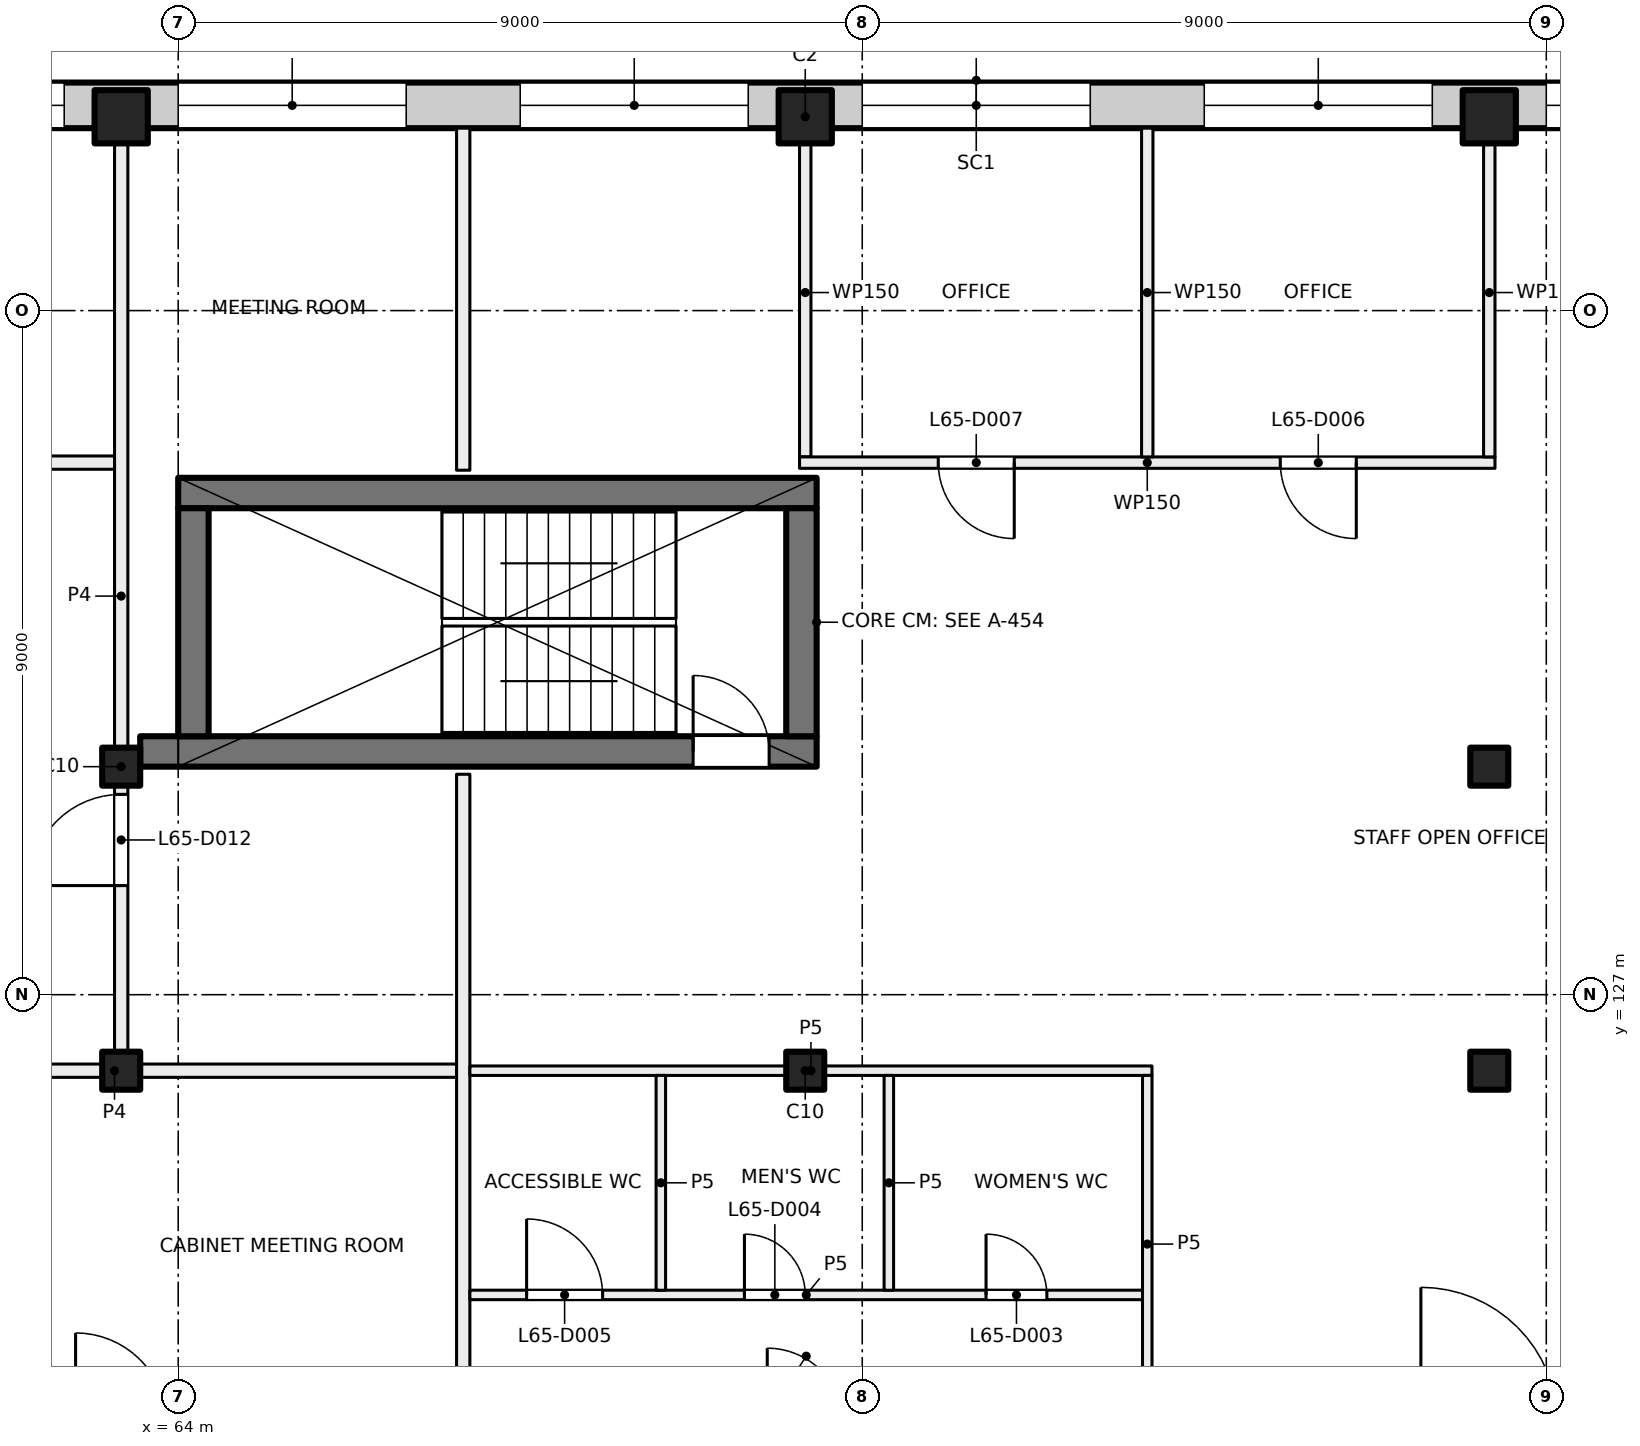
"""IFC4 building model, lengths in metres.
Left out: names, types, materials, properties, quantities, classifications, styles, units other than length and angle.
Written with IfcOpenShell. Run it as: python <this file> out.ifc"""

import sys

from ifc_helpers import new_model, si_unit, direction, frame, frame_2d, origin, origin_2d, place, context, subcontext, project, spatial, rectangle, extrude, element, fill, save


model = new_model("IFC4")
c1 = context("Model", 3, precision=1e-05, world=origin(), true_north=direction((0.0, 1.0)))
c2 = subcontext(c1, "Body", "Model", "MODEL_VIEW")
j1 = project(units=[si_unit("LENGTHUNIT", "METRE"), si_unit("PLANEANGLEUNIT", "RADIAN")], contexts=[c1])
p1 = place(None, origin())
s1 = spatial("IfcSite", under=j1, at=p1, CompositionType="ELEMENT")
p2 = place(p1, origin())
s2 = spatial("IfcBuilding", under=s1, at=p2, CompositionType="ELEMENT")
p3 = place(p2, frame((0.0, 0.0, 273.5)))
s3 = spatial("IfcBuildingStorey", under=s2, at=p3, CompositionType="ELEMENT", Elevation=273.5)
for number, where, z_axis, x_axis in (
    (1, (63.25, 130.0, 0.0), (0.0, 0.0, 1.0), (1.0, 0.0, 0.0)),
    (2, (81.25, 130.0, 0.0), (0.0, 0.0, 1.0), (1.0, 0.0, 0.0)),
    (3, (63.25, 126.0, 0.0), (0.0, 0.0, 1.0), (1.0, 0.0, 0.0)),
    (4, (72.25, 126.0, 0.0), (0.0, 0.0, 1.0), (1.0, 0.0, 0.0)),
    (5, (81.25, 126.0, 0.0), (0.0, 0.0, 1.0), (1.0, 0.0, 0.0)),
):
    element("IfcColumn", number, at=place(p3, frame(where, z_axis=z_axis, x_axis=x_axis)), inside=s3, PredefinedType="COLUMN", context=c2, shape_type="SweptSolid", body=[
        extrude(rectangle(XDim=0.5, YDim=0.5, at=origin_2d()), origin(), (0.0, 0.0, 1.0), 4.0),
    ])
for number, where, z_axis, x_axis in (
    (6, (63.25, 138.55, 0.0), (0.0, 0.0, 1.0), (1.0, 0.0, 0.0)),
    (7, (72.25, 138.55, 0.0), (0.0, 0.0, 1.0), (1.0, 0.0, 0.0)),
    (8, (81.25, 138.55, 0.0), (0.0, 0.0, 1.0), (1.0, 0.0, 0.0)),
):
    element("IfcColumn", number, at=place(p3, frame(where, z_axis=z_axis, x_axis=x_axis)), inside=s3, PredefinedType="COLUMN", context=c2, shape_type="SweptSolid", body=[
        extrude(rectangle(XDim=0.7, YDim=0.7, at=origin_2d()), origin(), (0.0, 0.0, 1.0), 4.0),
    ])
p4 = place(p3, frame((63.5, 130.2, 0.0), z_axis=(0.0, 0.0, 1.0), x_axis=(1.0, 0.0, 0.0)))
e9 = element("IfcWall", 9, at=p4, inside=s3, PredefinedType="SHEAR", context=c2, shape_type="SweptSolid", body=[
    extrude(rectangle(XDim=8.9, YDim=0.4, at=frame_2d((4.45, 0.0))), origin(), (0.0, 0.0, 1.0), 4.0),
])
p5 = place(p4, frame((7.275, 0.0, 0.0)))
e10 = element("IfcOpeningElement", 10, at=p5, cuts=e9, PredefinedType="OPENING", context=c2, shape_type="SweptSolid", body=[
    extrude(rectangle(XDim=1.0, YDim=2.1, at=frame_2d((0.5, 1.05))), frame((0.0, 0.21, 0.0), z_axis=(0.0, -1.0, 0.0), x_axis=(1.0, 0.0, 0.0)), (0.0, 0.0, 1.0), 0.42),
])
p6 = place(p3, frame((64.0, 133.6, 0.0), z_axis=(0.0, 0.0, 1.0), x_axis=(1.0, 0.0, 0.0)))
e11 = element("IfcWall", 11, at=p6, inside=s3, PredefinedType="SHEAR", context=c2, shape_type="SweptSolid", body=[
    extrude(rectangle(XDim=8.4, YDim=0.4, at=frame_2d((4.2, 0.0))), origin(), (0.0, 0.0, 1.0), 4.0),
])
for number, where, z_axis, x_axis in (
    (12, (64.2, 130.4, 0.0), (0.0, 0.0, 1.0), (0.0, 1.0, 0.0)),
    (13, (72.2, 130.4, 0.0), (0.0, 0.0, 1.0), (0.0, 1.0, 0.0)),
):
    element("IfcWall", number, at=place(p3, frame(where, z_axis=z_axis, x_axis=x_axis)), inside=s3, PredefinedType="SHEAR", context=c2, shape_type="SweptSolid", body=[
        extrude(rectangle(XDim=3.0, YDim=0.4, at=frame_2d((1.5, 0.0))), origin(), (0.0, 0.0, 1.0), 4.0),
    ])
p7 = place(p3, frame((47.07, 138.7, 0.0), z_axis=(0.0, 0.0, 1.0), x_axis=(1.0, 0.0, 0.0)))
e14 = element("IfcWall", 14, at=p7, inside=s3, PredefinedType="SOLIDWALL", context=c2, shape_type="SweptSolid", body=[
    extrude(rectangle(XDim=43.91, YDim=0.6, at=frame_2d((21.955, 0.0))), origin(), (0.0, 0.0, 1.0), 3.625),
])
p8 = place(p7, frame((3.43, 0.0, 0.9)))
e15 = element("IfcOpeningElement", 15, at=p8, cuts=e14, PredefinedType="OPENING", context=c2, shape_type="SweptSolid", body=[
    extrude(rectangle(XDim=3.0, YDim=2.4, at=frame_2d((1.5, 1.2))), frame((0.0, 0.31, 0.0), z_axis=(0.0, -1.0, 0.0), x_axis=(1.0, 0.0, 0.0)), (0.0, 0.0, 1.0), 0.62),
])
p9 = place(p7, frame((7.93, 0.0, 0.9)))
e16 = element("IfcOpeningElement", 16, at=p9, cuts=e14, PredefinedType="OPENING", context=c2, shape_type="SweptSolid", body=[
    extrude(rectangle(XDim=3.0, YDim=2.4, at=frame_2d((1.5, 1.2))), frame((0.0, 0.31, 0.0), z_axis=(0.0, -1.0, 0.0), x_axis=(1.0, 0.0, 0.0)), (0.0, 0.0, 1.0), 0.62),
])
p10 = place(p7, frame((12.43, 0.0, 0.9)))
e17 = element("IfcOpeningElement", 17, at=p10, cuts=e14, PredefinedType="OPENING", context=c2, shape_type="SweptSolid", body=[
    extrude(rectangle(XDim=3.0, YDim=2.4, at=frame_2d((1.5, 1.2))), frame((0.0, 0.31, 0.0), z_axis=(0.0, -1.0, 0.0), x_axis=(1.0, 0.0, 0.0)), (0.0, 0.0, 1.0), 0.62),
])
p11 = place(p7, frame((16.93, 0.0, 0.9)))
e18 = element("IfcOpeningElement", 18, at=p11, cuts=e14, PredefinedType="OPENING", context=c2, shape_type="SweptSolid", body=[
    extrude(rectangle(XDim=3.0, YDim=2.4, at=frame_2d((1.5, 1.2))), frame((0.0, 0.31, 0.0), z_axis=(0.0, -1.0, 0.0), x_axis=(1.0, 0.0, 0.0)), (0.0, 0.0, 1.0), 0.62),
])
p12 = place(p7, frame((21.43, 0.0, 0.9)))
e19 = element("IfcOpeningElement", 19, at=p12, cuts=e14, PredefinedType="OPENING", context=c2, shape_type="SweptSolid", body=[
    extrude(rectangle(XDim=3.0, YDim=2.4, at=frame_2d((1.5, 1.2))), frame((0.0, 0.31, 0.0), z_axis=(0.0, -1.0, 0.0), x_axis=(1.0, 0.0, 0.0)), (0.0, 0.0, 1.0), 0.62),
])
p13 = place(p7, frame((25.93, 0.0, 0.9)))
e20 = element("IfcOpeningElement", 20, at=p13, cuts=e14, PredefinedType="OPENING", context=c2, shape_type="SweptSolid", body=[
    extrude(rectangle(XDim=3.0, YDim=2.4, at=frame_2d((1.5, 1.2))), frame((0.0, 0.31, 0.0), z_axis=(0.0, -1.0, 0.0), x_axis=(1.0, 0.0, 0.0)), (0.0, 0.0, 1.0), 0.62),
])
p14 = place(p7, frame((30.43, 0.0, 0.9)))
e21 = element("IfcOpeningElement", 21, at=p14, cuts=e14, PredefinedType="OPENING", context=c2, shape_type="SweptSolid", body=[
    extrude(rectangle(XDim=3.0, YDim=2.4, at=frame_2d((1.5, 1.2))), frame((0.0, 0.31, 0.0), z_axis=(0.0, -1.0, 0.0), x_axis=(1.0, 0.0, 0.0)), (0.0, 0.0, 1.0), 0.62),
])
p15 = place(p7, frame((34.93, 0.0, 0.9)))
e22 = element("IfcOpeningElement", 22, at=p15, cuts=e14, PredefinedType="OPENING", context=c2, shape_type="SweptSolid", body=[
    extrude(rectangle(XDim=3.0, YDim=2.4, at=frame_2d((1.5, 1.2))), frame((0.0, 0.31, 0.0), z_axis=(0.0, -1.0, 0.0), x_axis=(1.0, 0.0, 0.0)), (0.0, 0.0, 1.0), 0.62),
])
p16 = place(p7, frame((39.43, 0.0, 0.9)))
e23 = element("IfcOpeningElement", 23, at=p16, cuts=e14, PredefinedType="OPENING", context=c2, shape_type="SweptSolid", body=[
    extrude(rectangle(XDim=3.0, YDim=2.4, at=frame_2d((1.5, 1.2))), frame((0.0, 0.31, 0.0), z_axis=(0.0, -1.0, 0.0), x_axis=(1.0, 0.0, 0.0)), (0.0, 0.0, 1.0), 0.62),
])
p17 = place(p3, frame((63.162, 134.0, 0.0), z_axis=(0.0, 0.0, 1.0), x_axis=(-1.0, 0.0, 0.0)))
e24 = element("IfcWall", 24, at=p17, inside=s3, PredefinedType="PARTITIONING", context=c2, shape_type="SweptSolid", body=[
    extrude(rectangle(XDim=8.824, YDim=0.175, at=frame_2d((4.412, 0.0))), origin(), (0.0, 0.0, 1.0), 3.625),
])
p18 = place(p17, frame((3.812, 0.0, 0.0)))
e25 = element("IfcOpeningElement", 25, at=p18, cuts=e24, PredefinedType="OPENING", context=c2, shape_type="SweptSolid", body=[
    extrude(rectangle(XDim=1.2, YDim=2.1, at=frame_2d((0.6, 1.05))), frame((0.0, 0.097, 0.0), z_axis=(0.0, -1.0, 0.0), x_axis=(1.0, 0.0, 0.0)), (0.0, 0.0, 1.0), 0.195),
])
p19 = place(p3, frame((58.662, 126.0, 0.0), z_axis=(0.0, 0.0, 1.0), x_axis=(1.0, 0.0, 0.0)))
e26 = element("IfcWall", 26, at=p19, inside=s3, PredefinedType="PARTITIONING", context=c2, shape_type="SweptSolid", body=[
    extrude(rectangle(XDim=9.0, YDim=0.175, at=frame_2d((4.5, 0.0))), origin(), (0.0, 0.0, 1.0), 3.625),
])
p20 = place(p3, frame((63.25, 126.088, 0.0), z_axis=(0.0, 0.0, 1.0), x_axis=(0.0, 1.0, 0.0)))
e27 = element("IfcWall", 27, at=p20, inside=s3, PredefinedType="PARTITIONING", context=c2, shape_type="SweptSolid", body=[
    extrude(rectangle(XDim=12.312, YDim=0.175, at=frame_2d((6.156, 0.0))), origin(), (0.0, 0.0, 1.0), 3.625),
])
p21 = place(p20, frame((2.347, 0.0, 0.0)))
e28 = element("IfcOpeningElement", 28, at=p21, cuts=e27, PredefinedType="OPENING", context=c2, shape_type="SweptSolid", body=[
    extrude(rectangle(XDim=1.2, YDim=2.1, at=frame_2d((0.6, 1.05))), frame((0.0, 0.097, 0.0), z_axis=(0.0, -1.0, 0.0), x_axis=(1.0, 0.0, 0.0)), (0.0, 0.0, 1.0), 0.195),
])
p22 = place(p3, frame((67.75, 121.5, 0.0), z_axis=(0.0, 0.0, 1.0), x_axis=(0.0, 1.0, 0.0)))
e29 = element("IfcWall", 29, at=p22, inside=s3, PredefinedType="PARTITIONING", context=c2, shape_type="SweptSolid", body=[
    extrude(rectangle(XDim=8.4, YDim=0.175, at=frame_2d((4.2, 0.0))), origin(), (0.0, 0.0, 1.0), 3.625),
])
p23 = place(p3, frame((67.838, 123.05, 0.0), z_axis=(0.0, 0.0, 1.0), x_axis=(1.0, 0.0, 0.0)))
e30 = element("IfcWall", 30, at=p23, inside=s3, PredefinedType="PARTITIONING", context=c2, shape_type="SweptSolid", body=[
    extrude(rectangle(XDim=8.85, YDim=0.125, at=frame_2d((4.425, 0.0))), origin(), (0.0, 0.0, 1.0), 3.625),
])
p24 = place(p23, frame((6.791, 0.0, 0.0)))
e31 = element("IfcOpeningElement", 31, at=p24, cuts=e30, PredefinedType="OPENING", context=c2, shape_type="SweptSolid", body=[
    extrude(rectangle(XDim=0.8, YDim=2.1, at=frame_2d((0.4, 1.05))), frame((0.0, 0.073, 0.0), z_axis=(0.0, -1.0, 0.0), x_axis=(1.0, 0.0, 0.0)), (0.0, 0.0, 1.0), 0.145),
])
p25 = place(p23, frame((3.612, 0.0, 0.0)))
e32 = element("IfcOpeningElement", 32, at=p25, cuts=e30, PredefinedType="OPENING", context=c2, shape_type="SweptSolid", body=[
    extrude(rectangle(XDim=0.8, YDim=2.1, at=frame_2d((0.4, 1.05))), frame((0.0, 0.073, 0.0), z_axis=(0.0, -1.0, 0.0), x_axis=(1.0, 0.0, 0.0)), (0.0, 0.0, 1.0), 0.145),
])
p26 = place(p23, frame((0.746, 0.0, 0.0)))
e33 = element("IfcOpeningElement", 33, at=p26, cuts=e30, PredefinedType="OPENING", context=c2, shape_type="SweptSolid", body=[
    extrude(rectangle(XDim=1.0, YDim=2.1, at=frame_2d((0.5, 1.05))), frame((0.0, 0.073, 0.0), z_axis=(0.0, -1.0, 0.0), x_axis=(1.0, 0.0, 0.0)), (0.0, 0.0, 1.0), 0.145),
])
p27 = place(p3, frame((67.838, 126.0, 0.0), z_axis=(0.0, 0.0, 1.0), x_axis=(1.0, 0.0, 0.0)))
e34 = element("IfcWall", 34, at=p27, inside=s3, PredefinedType="PARTITIONING", context=c2, shape_type="SweptSolid", body=[
    extrude(rectangle(XDim=8.974, YDim=0.125, at=frame_2d((4.487, 0.0))), origin(), (0.0, 0.0, 1.0), 3.625),
])
p28 = place(p3, frame((67.75, 133.9, 0.0), z_axis=(0.0, 0.0, 1.0), x_axis=(0.0, 1.0, 0.0)))
e35 = element("IfcWall", 35, at=p28, inside=s3, PredefinedType="PARTITIONING", context=c2, shape_type="SweptSolid", body=[
    extrude(rectangle(XDim=4.5, YDim=0.175, at=frame_2d((2.25, 0.0))), origin(), (0.0, 0.0, 1.0), 3.625),
])
p29 = place(p3, frame((70.35, 125.938, 0.0), z_axis=(0.0, 0.0, 1.0), x_axis=(0.0, -1.0, 0.0)))
e36 = element("IfcWall", 36, at=p29, inside=s3, PredefinedType="PARTITIONING", context=c2, shape_type="SweptSolid", body=[
    extrude(rectangle(XDim=2.826, YDim=0.125, at=frame_2d((1.413, 0.0))), origin(), (0.0, 0.0, 1.0), 3.625),
])
p30 = place(p3, frame((72.25, 134.075, 0.0), z_axis=(0.0, 0.0, 1.0), x_axis=(0.0, 1.0, 0.0)))
e37 = element("IfcWall", 37, at=p30, inside=s3, PredefinedType="PARTITIONING", context=c2, shape_type="SweptSolid", body=[
    extrude(rectangle(XDim=4.325, YDim=0.15, at=frame_2d((2.163, 0.0))), origin(), (0.0, 0.0, 1.0), 3.625),
])
p31 = place(p3, frame((81.325, 134.0, 0.0), z_axis=(0.0, 0.0, 1.0), x_axis=(-1.0, 0.0, 0.0)))
e38 = element("IfcWall", 38, at=p31, inside=s3, PredefinedType="PARTITIONING", context=c2, shape_type="SweptSolid", body=[
    extrude(rectangle(XDim=9.15, YDim=0.15, at=frame_2d((4.575, 0.0))), origin(), (0.0, 0.0, 1.0), 3.625),
])
p32 = place(p31, frame((1.825, 0.0, 0.0)))
e39 = element("IfcOpeningElement", 39, at=p32, cuts=e38, PredefinedType="OPENING", context=c2, shape_type="SweptSolid", body=[
    extrude(rectangle(XDim=1.0, YDim=2.1, at=frame_2d((0.5, 1.05))), frame((0.0, 0.085, 0.0), z_axis=(0.0, -1.0, 0.0), x_axis=(1.0, 0.0, 0.0)), (0.0, 0.0, 1.0), 0.17),
])
p33 = place(p31, frame((6.325, 0.0, 0.0)))
e40 = element("IfcOpeningElement", 40, at=p33, cuts=e38, PredefinedType="OPENING", context=c2, shape_type="SweptSolid", body=[
    extrude(rectangle(XDim=1.0, YDim=2.1, at=frame_2d((0.5, 1.05))), frame((0.0, 0.085, 0.0), z_axis=(0.0, -1.0, 0.0), x_axis=(1.0, 0.0, 0.0)), (0.0, 0.0, 1.0), 0.17),
])
p34 = place(p3, frame((73.35, 125.938, 0.0), z_axis=(0.0, 0.0, 1.0), x_axis=(0.0, -1.0, 0.0)))
e41 = element("IfcWall", 41, at=p34, inside=s3, PredefinedType="PARTITIONING", context=c2, shape_type="SweptSolid", body=[
    extrude(rectangle(XDim=2.826, YDim=0.125, at=frame_2d((1.413, 0.0))), origin(), (0.0, 0.0, 1.0), 3.625),
])
p35 = place(p3, frame((76.75, 125.938, 0.0), z_axis=(0.0, 0.0, 1.0), x_axis=(0.0, -1.0, 0.0)))
e42 = element("IfcWall", 42, at=p35, inside=s3, PredefinedType="PARTITIONING", context=c2, shape_type="SweptSolid", body=[
    extrude(rectangle(XDim=4.438, YDim=0.125, at=frame_2d((2.219, 0.0))), origin(), (0.0, 0.0, 1.0), 3.625),
])
for number, where, z_axis, x_axis in (
    (43, (76.75, 134.075, 0.0), (0.0, 0.0, 1.0), (0.0, 1.0, 0.0)),
    (44, (81.25, 138.4, 0.0), (0.0, 0.0, 1.0), (0.0, -1.0, 0.0)),
):
    element("IfcWall", number, at=place(p3, frame(where, z_axis=z_axis, x_axis=x_axis)), inside=s3, PredefinedType="PARTITIONING", context=c2, shape_type="SweptSolid", body=[
        extrude(rectangle(XDim=4.325, YDim=0.15, at=frame_2d((2.163, 0.0))), origin(), (0.0, 0.0, 1.0), 3.625),
    ])
p36 = place(p10, origin())
e45 = element("IfcWindow", 45, at=p36, inside=s3, PartitioningType="SINGLE_PANEL", PredefinedType="WINDOW", context=c2, shape_type="SweptSolid", body=[
    extrude(rectangle(XDim=3.0, YDim=2.4, at=frame_2d((1.5, 1.2))), frame((0.0, 0.03, 0.0), z_axis=(0.0, -1.0, 0.0), x_axis=(1.0, 0.0, 0.0)), (0.0, 0.0, 1.0), 0.06),
])
fill(e17, e45)
p37 = place(p11, origin())
e46 = element("IfcWindow", 46, at=p37, inside=s3, PartitioningType="SINGLE_PANEL", PredefinedType="WINDOW", context=c2, shape_type="SweptSolid", body=[
    extrude(rectangle(XDim=3.0, YDim=2.4, at=frame_2d((1.5, 1.2))), frame((0.0, 0.03, 0.0), z_axis=(0.0, -1.0, 0.0), x_axis=(1.0, 0.0, 0.0)), (0.0, 0.0, 1.0), 0.06),
])
fill(e18, e46)
p38 = place(p12, origin())
e47 = element("IfcWindow", 47, at=p38, inside=s3, PartitioningType="SINGLE_PANEL", PredefinedType="WINDOW", context=c2, shape_type="SweptSolid", body=[
    extrude(rectangle(XDim=3.0, YDim=2.4, at=frame_2d((1.5, 1.2))), frame((0.0, 0.03, 0.0), z_axis=(0.0, -1.0, 0.0), x_axis=(1.0, 0.0, 0.0)), (0.0, 0.0, 1.0), 0.06),
])
fill(e19, e47)
p39 = place(p13, origin())
e48 = element("IfcWindow", 48, at=p39, inside=s3, PartitioningType="SINGLE_PANEL", PredefinedType="WINDOW", context=c2, shape_type="SweptSolid", body=[
    extrude(rectangle(XDim=3.0, YDim=2.4, at=frame_2d((1.5, 1.2))), frame((0.0, 0.03, 0.0), z_axis=(0.0, -1.0, 0.0), x_axis=(1.0, 0.0, 0.0)), (0.0, 0.0, 1.0), 0.06),
])
fill(e20, e48)
p40 = place(p14, origin())
e49 = element("IfcWindow", 49, at=p40, inside=s3, PartitioningType="SINGLE_PANEL", PredefinedType="WINDOW", context=c2, shape_type="SweptSolid", body=[
    extrude(rectangle(XDim=3.0, YDim=2.4, at=frame_2d((1.5, 1.2))), frame((0.0, 0.03, 0.0), z_axis=(0.0, -1.0, 0.0), x_axis=(1.0, 0.0, 0.0)), (0.0, 0.0, 1.0), 0.06),
])
fill(e21, e49)
p41 = place(p15, origin())
e50 = element("IfcWindow", 50, at=p41, inside=s3, PartitioningType="SINGLE_PANEL", PredefinedType="WINDOW", context=c2, shape_type="SweptSolid", body=[
    extrude(rectangle(XDim=3.0, YDim=2.4, at=frame_2d((1.5, 1.2))), frame((0.0, 0.03, 0.0), z_axis=(0.0, -1.0, 0.0), x_axis=(1.0, 0.0, 0.0)), (0.0, 0.0, 1.0), 0.06),
])
fill(e22, e50)
p42 = place(p5, origin())
e51 = element("IfcDoor", 51, at=p42, inside=s3, OperationType="SINGLE_SWING_LEFT", PredefinedType="DOOR", context=c2, shape_type="SweptSolid", body=[
    extrude(rectangle(XDim=1.0, YDim=2.1, at=frame_2d((0.5, 1.05))), frame((0.0, 0.025, 0.0), z_axis=(0.0, -1.0, 0.0), x_axis=(1.0, 0.0, 0.0)), (0.0, 0.0, 1.0), 0.05),
])
fill(e10, e51)
p43 = place(p24, origin())
e52 = element("IfcDoor", 52, at=p43, inside=s3, OperationType="SINGLE_SWING_RIGHT", PredefinedType="DOOR", context=c2, shape_type="SweptSolid", body=[
    extrude(rectangle(XDim=0.8, YDim=2.1, at=frame_2d((0.4, 1.05))), frame((0.0, 0.025, 0.0), z_axis=(0.0, -1.0, 0.0), x_axis=(1.0, 0.0, 0.0)), (0.0, 0.0, 1.0), 0.05),
])
fill(e31, e52)
p44 = place(p25, origin())
e53 = element("IfcDoor", 53, at=p44, inside=s3, OperationType="SINGLE_SWING_LEFT", PredefinedType="DOOR", context=c2, shape_type="SweptSolid", body=[
    extrude(rectangle(XDim=0.8, YDim=2.1, at=frame_2d((0.4, 1.05))), frame((0.0, 0.025, 0.0), z_axis=(0.0, -1.0, 0.0), x_axis=(1.0, 0.0, 0.0)), (0.0, 0.0, 1.0), 0.05),
])
fill(e32, e53)
p45 = place(p26, origin())
e54 = element("IfcDoor", 54, at=p45, inside=s3, OperationType="SINGLE_SWING_LEFT", PredefinedType="DOOR", context=c2, shape_type="SweptSolid", body=[
    extrude(rectangle(XDim=1.0, YDim=2.1, at=frame_2d((0.5, 1.05))), frame((0.0, 0.025, 0.0), z_axis=(0.0, -1.0, 0.0), x_axis=(1.0, 0.0, 0.0)), (0.0, 0.0, 1.0), 0.05),
])
fill(e33, e54)
p46 = place(p32, origin())
e55 = element("IfcDoor", 55, at=p46, inside=s3, OperationType="SINGLE_SWING_LEFT", PredefinedType="DOOR", context=c2, shape_type="SweptSolid", body=[
    extrude(rectangle(XDim=1.0, YDim=2.1, at=frame_2d((0.5, 1.05))), frame((0.0, 0.025, 0.0), z_axis=(0.0, -1.0, 0.0), x_axis=(1.0, 0.0, 0.0)), (0.0, 0.0, 1.0), 0.05),
])
fill(e39, e55)
p47 = place(p33, origin())
e56 = element("IfcDoor", 56, at=p47, inside=s3, OperationType="SINGLE_SWING_RIGHT", PredefinedType="DOOR", context=c2, shape_type="SweptSolid", body=[
    extrude(rectangle(XDim=1.0, YDim=2.1, at=frame_2d((0.5, 1.05))), frame((0.0, 0.025, 0.0), z_axis=(0.0, -1.0, 0.0), x_axis=(1.0, 0.0, 0.0)), (0.0, 0.0, 1.0), 0.05),
])
fill(e40, e56)
p48 = place(p21, origin())
e57 = element("IfcDoor", 57, at=p48, inside=s3, OperationType="DOUBLE_DOOR_SINGLE_SWING", PredefinedType="DOOR", context=c2, shape_type="SweptSolid", body=[
    extrude(rectangle(XDim=1.2, YDim=2.1, at=frame_2d((0.6, 1.05))), frame((0.0, 0.025, 0.0), z_axis=(0.0, -1.0, 0.0), x_axis=(1.0, 0.0, 0.0)), (0.0, 0.0, 1.0), 0.05),
])
fill(e28, e57)
save(model, sys.argv[1])
